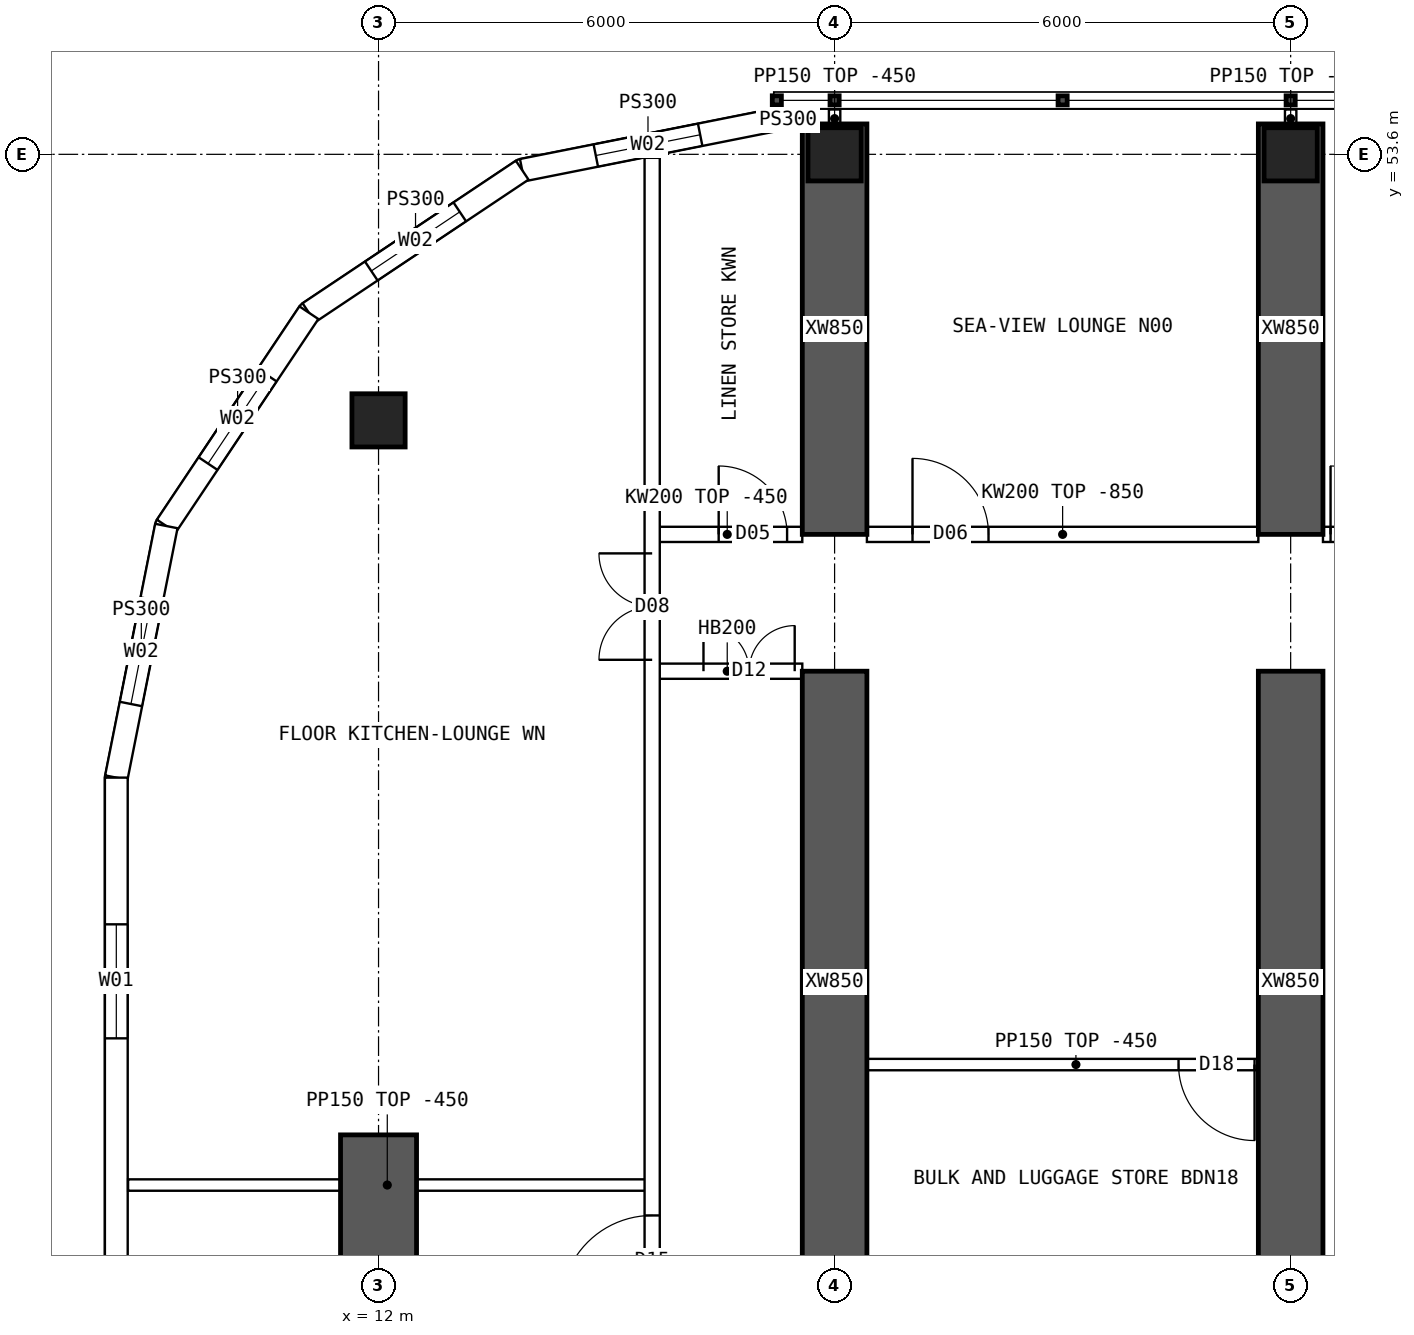
"""IFC4 building model, lengths in metres.
Left out: names, types, materials, properties, quantities, classifications, styles, units other than length and angle.
Written with IfcOpenShell. Run it as: python <this file> out.ifc"""

import sys

from ifc_helpers import new_model, si_unit, direction, frame, frame_2d, origin, origin_2d, place, context, subcontext, project, spatial, polyline, rectangle, hollow_rectangle, outline, extrude, element, fill, save


model = new_model("IFC4")
c1 = context("Model", 3, precision=1e-05, world=origin(), true_north=direction((0.0, 1.0)))
c2 = subcontext(c1, "Body", "Model", "MODEL_VIEW")
j1 = project(units=[si_unit("LENGTHUNIT", "METRE"), si_unit("PLANEANGLEUNIT", "RADIAN")], contexts=[c1])
p1 = place(None, origin())
s1 = spatial("IfcSite", under=j1, at=p1, CompositionType="ELEMENT")
p2 = place(p1, origin())
s2 = spatial("IfcBuilding", under=s1, at=p2, CompositionType="ELEMENT")
p3 = place(p2, frame((0.0, 0.0, 174.85)))
s3 = spatial("IfcBuildingStorey", under=s2, at=p3, CompositionType="ELEMENT", Elevation=174.85)
for number, where, z_axis, x_axis in (
    (1, (18.0, 53.6, 0.0), (0.0, 0.0, 1.0), (1.0, 0.0, 0.0)),
    (2, (24.0, 53.6, 0.0), (0.0, 0.0, 1.0), (1.0, 0.0, 0.0)),
    (3, (12.0, 50.1, 0.0), (0.0, 0.0, 1.0), (1.0, 0.0, 0.0)),
):
    element("IfcColumn", number, at=place(p3, frame(where, z_axis=z_axis, x_axis=x_axis)), inside=s3, PredefinedType="COLUMN", context=c2, shape_type="SweptSolid", body=[
        extrude(hollow_rectangle(XDim=0.7, YDim=0.7, WallThickness=0.07, at=origin_2d()), origin(), (0.0, 0.0, 1.0), 3.75),
    ])
p4 = place(p3, frame((12.0, 35.7, 0.0), z_axis=(0.0, 0.0, 1.0), x_axis=(0.0, 1.0, 0.0)))
e4 = element("IfcWall", 4, at=p4, inside=s3, PredefinedType="SHEAR", context=c2, shape_type="SweptSolid", body=[
    extrude(rectangle(XDim=5.0, YDim=1.0, at=frame_2d((2.5, 0.0))), origin(), (0.0, 0.0, 1.0), 3.75),
])
p5 = place(p3, frame((18.0, 48.6, 0.0), z_axis=(0.0, 0.0, 1.0), x_axis=(0.0, 1.0, 0.0)))
e5 = element("IfcWall", 5, at=p5, inside=s3, PredefinedType="SHEAR", context=c2, shape_type="SweptSolid", body=[
    extrude(rectangle(XDim=5.4, YDim=0.85, at=frame_2d((2.7, 0.0))), origin(), (0.0, 0.0, 1.0), 3.75),
])
p6 = place(p3, frame((18.0, 38.625, 0.0), z_axis=(0.0, 0.0, 1.0), x_axis=(0.0, 1.0, 0.0)))
e6 = element("IfcWall", 6, at=p6, inside=s3, PredefinedType="SHEAR", context=c2, shape_type="SweptSolid", body=[
    extrude(rectangle(XDim=8.175, YDim=0.85, at=frame_2d((4.087, 0.0))), origin(), (0.0, 0.0, 1.0), 3.75),
])
p7 = place(p3, frame((24.0, 48.6, 0.0), z_axis=(0.0, 0.0, 1.0), x_axis=(0.0, 1.0, 0.0)))
e7 = element("IfcWall", 7, at=p7, inside=s3, PredefinedType="SHEAR", context=c2, shape_type="SweptSolid", body=[
    extrude(rectangle(XDim=5.4, YDim=0.85, at=frame_2d((2.7, 0.0))), origin(), (0.0, 0.0, 1.0), 3.75),
])
p8 = place(p3, frame((24.0, 38.625, 0.0), z_axis=(0.0, 0.0, 1.0), x_axis=(0.0, 1.0, 0.0)))
e8 = element("IfcWall", 8, at=p8, inside=s3, PredefinedType="SHEAR", context=c2, shape_type="SweptSolid", body=[
    extrude(rectangle(XDim=8.175, YDim=0.85, at=frame_2d((4.087, 0.0))), origin(), (0.0, 0.0, 1.0), 3.75),
])
p9 = place(p3, frame((8.55, 45.4, 0.0), z_axis=(0.0, 0.0, 1.0), x_axis=(0.0, -1.0, 0.0)))
e9 = element("IfcWall", 9, at=p9, inside=s3, PredefinedType="SOLIDWALL", context=c2, shape_type="SweptSolid", body=[
    extrude(outline(polyline([(-0.015, -0.15), (26.815, -0.15), (26.785, 0.15), (0.015, 0.15), (-0.015, -0.15)])), origin(), (0.0, 0.0, 1.0), 3.3),
])
p10 = place(p9, frame((1.93, 0.0, 0.9)))
e10 = element("IfcOpeningElement", 10, at=p10, cuts=e9, PredefinedType="OPENING", context=c2, shape_type="SweptSolid", body=[
    extrude(rectangle(XDim=1.5, YDim=2.0, at=frame_2d((0.75, 1.0))), frame((0.0, 0.16, 0.0), z_axis=(0.0, -1.0, 0.0), x_axis=(1.0, 0.0, 0.0)), (0.0, 0.0, 1.0), 0.32),
])
p11 = place(p9, frame((7.29, 0.0, 0.9)))
e11 = element("IfcOpeningElement", 11, at=p11, cuts=e9, PredefinedType="OPENING", context=c2, shape_type="SweptSolid", body=[
    extrude(rectangle(XDim=1.5, YDim=2.0, at=frame_2d((0.75, 1.0))), frame((0.0, 0.16, 0.0), z_axis=(0.0, -1.0, 0.0), x_axis=(1.0, 0.0, 0.0)), (0.0, 0.0, 1.0), 0.32),
])
p12 = place(p9, frame((12.65, 0.0, 0.9)))
e12 = element("IfcOpeningElement", 12, at=p12, cuts=e9, PredefinedType="OPENING", context=c2, shape_type="SweptSolid", body=[
    extrude(rectangle(XDim=1.5, YDim=2.0, at=frame_2d((0.75, 1.0))), frame((0.0, 0.16, 0.0), z_axis=(0.0, -1.0, 0.0), x_axis=(1.0, 0.0, 0.0)), (0.0, 0.0, 1.0), 0.32),
])
p13 = place(p9, frame((18.01, 0.0, 0.9)))
e13 = element("IfcOpeningElement", 13, at=p13, cuts=e9, PredefinedType="OPENING", context=c2, shape_type="SweptSolid", body=[
    extrude(rectangle(XDim=1.5, YDim=2.0, at=frame_2d((0.75, 1.0))), frame((0.0, 0.16, 0.0), z_axis=(0.0, -1.0, 0.0), x_axis=(1.0, 0.0, 0.0)), (0.0, 0.0, 1.0), 0.32),
])
p14 = place(p9, frame((23.37, 0.0, 0.9)))
e14 = element("IfcOpeningElement", 14, at=p14, cuts=e9, PredefinedType="OPENING", context=c2, shape_type="SweptSolid", body=[
    extrude(rectangle(XDim=1.5, YDim=2.0, at=frame_2d((0.75, 1.0))), frame((0.0, 0.16, 0.0), z_axis=(0.0, -1.0, 0.0), x_axis=(1.0, 0.0, 0.0)), (0.0, 0.0, 1.0), 0.32),
])
p15 = place(p3, frame((17.2, 54.05, 0.0), z_axis=(0.0, 0.0, 1.0), x_axis=(-0.98078325777, -0.195100490205, 0.0)))
e15 = element("IfcWall", 15, at=p15, inside=s3, PredefinedType="SOLIDWALL", context=c2, shape_type="SweptSolid", body=[
    extrude(outline(polyline([(-0.03, -0.15), (3.405, -0.15), (3.345, 0.15), (0.03, 0.15), (-0.03, -0.15)])), origin(), (0.0, 0.0, 1.0), 3.3),
])
p16 = place(p15, frame((0.988, 0.0, 0.9)))
e16 = element("IfcOpeningElement", 16, at=p16, cuts=e15, PredefinedType="OPENING", context=c2, shape_type="SweptSolid", body=[
    extrude(rectangle(XDim=1.4, YDim=1.8, at=frame_2d((0.7, 0.9))), frame((0.0, 0.16, 0.0), z_axis=(0.0, -1.0, 0.0), x_axis=(1.0, 0.0, 0.0)), (0.0, 0.0, 1.0), 0.32),
])
p17 = place(p3, frame((13.89, 53.392, 0.0), z_axis=(0.0, 0.0, 1.0), x_axis=(-0.831493450887, -0.555534554399, 0.0)))
e17 = element("IfcWall", 17, at=p17, inside=s3, PredefinedType="SOLIDWALL", context=c2, shape_type="SweptSolid", body=[
    extrude(outline(polyline([(-0.03, -0.15), (3.405, -0.15), (3.345, 0.15), (0.03, 0.15), (-0.03, -0.15)])), origin(), (0.0, 0.0, 1.0), 3.3),
])
p18 = place(p17, frame((0.988, 0.0, 0.9)))
e18 = element("IfcOpeningElement", 18, at=p18, cuts=e17, PredefinedType="OPENING", context=c2, shape_type="SweptSolid", body=[
    extrude(rectangle(XDim=1.4, YDim=1.8, at=frame_2d((0.7, 0.9))), frame((0.0, 0.16, 0.0), z_axis=(0.0, -1.0, 0.0), x_axis=(1.0, 0.0, 0.0)), (0.0, 0.0, 1.0), 0.32),
])
p19 = place(p3, frame((11.083, 51.517, 0.0), z_axis=(0.0, 0.0, 1.0), x_axis=(-0.555534554399, -0.831493450887, 0.0)))
e19 = element("IfcWall", 19, at=p19, inside=s3, PredefinedType="SOLIDWALL", context=c2, shape_type="SweptSolid", body=[
    extrude(outline(polyline([(-0.03, -0.15), (3.405, -0.15), (3.345, 0.15), (0.03, 0.15), (-0.03, -0.15)])), origin(), (0.0, 0.0, 1.0), 3.3),
])
p20 = place(p19, frame((0.988, 0.0, 0.9)))
e20 = element("IfcOpeningElement", 20, at=p20, cuts=e19, PredefinedType="OPENING", context=c2, shape_type="SweptSolid", body=[
    extrude(rectangle(XDim=1.4, YDim=1.8, at=frame_2d((0.7, 0.9))), frame((0.0, 0.16, 0.0), z_axis=(0.0, -1.0, 0.0), x_axis=(1.0, 0.0, 0.0)), (0.0, 0.0, 1.0), 0.32),
])
p21 = place(p3, frame((9.208, 48.71, 0.0), z_axis=(0.0, 0.0, 1.0), x_axis=(-0.19508664885, -0.980786011034, 0.0)))
e21 = element("IfcWall", 21, at=p21, inside=s3, PredefinedType="SOLIDWALL", context=c2, shape_type="SweptSolid", body=[
    extrude(outline(polyline([(-0.03, -0.15), (3.39, -0.15), (3.36, 0.15), (0.03, 0.15), (-0.03, -0.15)])), origin(), (0.0, 0.0, 1.0), 3.3),
])
p22 = place(p21, frame((0.988, 0.0, 0.9)))
e22 = element("IfcOpeningElement", 22, at=p22, cuts=e21, PredefinedType="OPENING", context=c2, shape_type="SweptSolid", body=[
    extrude(rectangle(XDim=1.4, YDim=1.8, at=frame_2d((0.7, 0.9))), frame((0.0, 0.16, 0.0), z_axis=(0.0, -1.0, 0.0), x_axis=(1.0, 0.0, 0.0)), (0.0, 0.0, 1.0), 0.32),
])
p23 = place(p3, frame((17.2, 54.05, 0.0), z_axis=(0.0, 0.0, 1.0), x_axis=(1.0, 0.0, 0.0)))
e23 = element("IfcWall", 23, at=p23, inside=s3, PredefinedType="SOLIDWALL", context=c2, shape_type="SweptSolid", body=[
    extrude(rectangle(XDim=0.375, YDim=0.3, at=frame_2d((0.188, 0.0))), origin(), (0.0, 0.0, 1.0), 3.3),
])
p24 = place(p3, frame((15.6, 48.6, 0.0), z_axis=(0.0, 0.0, 1.0), x_axis=(1.0, 0.0, 0.0)))
e24 = element("IfcWall", 24, at=p24, inside=s3, PredefinedType="SOLIDWALL", context=c2, shape_type="SweptSolid", body=[
    extrude(rectangle(XDim=1.975, YDim=0.2, at=frame_2d((0.987, 0.0))), origin(), (0.0, 0.0, 1.0), 3.3),
])
p25 = place(p24, frame((0.875, 0.0, 0.0)))
e25 = element("IfcOpeningElement", 25, at=p25, cuts=e24, PredefinedType="OPENING", context=c2, shape_type="SweptSolid", body=[
    extrude(rectangle(XDim=0.9, YDim=2.1, at=frame_2d((0.45, 1.05))), frame((0.0, 0.11, 0.0), z_axis=(0.0, -1.0, 0.0), x_axis=(1.0, 0.0, 0.0)), (0.0, 0.0, 1.0), 0.22),
])
p26 = place(p3, frame((15.6, 46.8, 0.0), z_axis=(0.0, 0.0, 1.0), x_axis=(1.0, 0.0, 0.0)))
e26 = element("IfcWall", 26, at=p26, inside=s3, PredefinedType="SOLIDWALL", context=c2, shape_type="SweptSolid", body=[
    extrude(rectangle(XDim=1.975, YDim=0.2, at=frame_2d((0.987, 0.0))), origin(), (0.0, 0.0, 1.0), 3.3),
])
p27 = place(p26, frame((0.675, 0.0, 0.0)))
e27 = element("IfcOpeningElement", 27, at=p27, cuts=e26, PredefinedType="OPENING", context=c2, shape_type="SweptSolid", body=[
    extrude(rectangle(XDim=1.2, YDim=2.1, at=frame_2d((0.6, 1.05))), frame((0.0, 0.11, 0.0), z_axis=(0.0, -1.0, 0.0), x_axis=(1.0, 0.0, 0.0)), (0.0, 0.0, 1.0), 0.22),
])
p28 = place(p3, frame((18.425, 48.6, 0.0), z_axis=(0.0, 0.0, 1.0), x_axis=(1.0, 0.0, 0.0)))
e28 = element("IfcWall", 28, at=p28, inside=s3, PredefinedType="SOLIDWALL", context=c2, shape_type="SweptSolid", body=[
    extrude(outline(polyline([(0.0, 0.0), (5.15, 0.0), (5.15, 2.9), (0.0, 2.9), (0.0, 0.0)])), frame((0.0, 0.1, 0.0), z_axis=(0.0, -1.0, 0.0), x_axis=(1.0, 0.0, 0.0)), (0.0, 0.0, 1.0), 0.2),
])
p29 = place(p28, frame((0.6, 0.0, 0.0)))
e29 = element("IfcOpeningElement", 29, at=p29, cuts=e28, PredefinedType="OPENING", context=c2, shape_type="SweptSolid", body=[
    extrude(rectangle(XDim=1.0, YDim=2.1, at=frame_2d((0.5, 1.05))), frame((0.0, 0.11, 0.0), z_axis=(0.0, -1.0, 0.0), x_axis=(1.0, 0.0, 0.0)), (0.0, 0.0, 1.0), 0.22),
])
p30 = place(p3, frame((24.425, 48.6, 0.0), z_axis=(0.0, 0.0, 1.0), x_axis=(1.0, 0.0, 0.0)))
e30 = element("IfcWall", 30, at=p30, inside=s3, PredefinedType="SOLIDWALL", context=c2, shape_type="SweptSolid", body=[
    extrude(outline(polyline([(0.0, 0.0), (5.15, 0.0), (5.15, 2.9), (0.0, 2.9), (0.0, 0.0)])), frame((0.0, 0.1, 0.0), z_axis=(0.0, -1.0, 0.0), x_axis=(1.0, 0.0, 0.0)), (0.0, 0.0, 1.0), 0.2),
])
p31 = place(p30, frame((0.1, 0.0, 0.0)))
e31 = element("IfcOpeningElement", 31, at=p31, cuts=e30, PredefinedType="OPENING", context=c2, shape_type="SweptSolid", body=[
    extrude(rectangle(XDim=0.9, YDim=2.1, at=frame_2d((0.45, 1.05))), frame((0.0, 0.11, 0.0), z_axis=(0.0, -1.0, 0.0), x_axis=(1.0, 0.0, 0.0)), (0.0, 0.0, 1.0), 0.22),
])
p32 = place(p3, frame((23.925, 41.625, 0.0), z_axis=(0.0, 0.0, 1.0), x_axis=(-1.0, 0.0, 0.0)))
e32 = element("IfcWall", 32, at=p32, inside=s3, PredefinedType="PARTITIONING", context=c2, shape_type="SweptSolid", body=[
    extrude(rectangle(XDim=5.5, YDim=0.15, at=frame_2d((2.75, 0.0))), origin(), (0.0, 0.0, 1.0), 3.3),
])
p33 = place(p32, frame((0.4, 0.0, 0.0)))
e33 = element("IfcOpeningElement", 33, at=p33, cuts=e32, PredefinedType="OPENING", context=c2, shape_type="SweptSolid", body=[
    extrude(rectangle(XDim=1.0, YDim=2.1, at=frame_2d((0.5, 1.05))), frame((0.0, 0.085, 0.0), z_axis=(0.0, -1.0, 0.0), x_axis=(1.0, 0.0, 0.0)), (0.0, 0.0, 1.0), 0.17),
])
p34 = place(p3, frame((15.6, 10.446, 0.0), z_axis=(0.0, 0.0, 1.0), x_axis=(0.0, 1.0, 0.0)))
e34 = element("IfcWall", 34, at=p34, inside=s3, PredefinedType="SOLIDWALL", context=c2, shape_type="SweptSolid", body=[
    extrude(rectangle(XDim=43.107, YDim=0.2, at=frame_2d((21.554, 0.0))), origin(), (0.0, 0.0, 1.0), 3.3),
])
p35 = place(p34, frame((13.914, 0.0, 0.0)))
e35 = element("IfcOpeningElement", 35, at=p35, cuts=e34, PredefinedType="OPENING", context=c2, shape_type="SweptSolid", body=[
    extrude(rectangle(XDim=1.2, YDim=2.1, at=frame_2d((0.6, 1.05))), frame((0.0, 0.11, 0.0), z_axis=(0.0, -1.0, 0.0), x_axis=(1.0, 0.0, 0.0)), (0.0, 0.0, 1.0), 0.22),
])
p36 = place(p34, frame((27.994, 0.0, 0.0)))
e36 = element("IfcOpeningElement", 36, at=p36, cuts=e34, PredefinedType="OPENING", context=c2, shape_type="SweptSolid", body=[
    extrude(rectangle(XDim=1.2, YDim=2.1, at=frame_2d((0.6, 1.05))), frame((0.0, 0.11, 0.0), z_axis=(0.0, -1.0, 0.0), x_axis=(1.0, 0.0, 0.0)), (0.0, 0.0, 1.0), 0.22),
])
p37 = place(p34, frame((5.104, 0.0, 0.0)))
e37 = element("IfcOpeningElement", 37, at=p37, cuts=e34, PredefinedType="OPENING", context=c2, shape_type="SweptSolid", body=[
    extrude(rectangle(XDim=1.4, YDim=2.1, at=frame_2d((0.7, 1.05))), frame((0.0, 0.11, 0.0), z_axis=(0.0, -1.0, 0.0), x_axis=(1.0, 0.0, 0.0)), (0.0, 0.0, 1.0), 0.22),
])
p38 = place(p34, frame((36.504, 0.0, 0.0)))
e38 = element("IfcOpeningElement", 38, at=p38, cuts=e34, PredefinedType="OPENING", context=c2, shape_type="SweptSolid", body=[
    extrude(rectangle(XDim=1.4, YDim=2.1, at=frame_2d((0.7, 1.05))), frame((0.0, 0.11, 0.0), z_axis=(0.0, -1.0, 0.0), x_axis=(1.0, 0.0, 0.0)), (0.0, 0.0, 1.0), 0.22),
])
p39 = place(p3, frame((8.705, 40.04, 0.0), z_axis=(0.0, 0.0, 1.0), x_axis=(1.0, 0.0, 0.0)))
e39 = element("IfcWall", 39, at=p39, inside=s3, PredefinedType="PARTITIONING", context=c2, shape_type="SweptSolid", body=[
    extrude(rectangle(XDim=6.82, YDim=0.15, at=frame_2d((3.41, 0.0))), origin(), (0.0, 0.0, 1.0), 3.3),
])
for number, where, z_axis, x_axis in (
    (40, (18.0, 53.95, 0.0), (0.0, 0.0, 1.0), (0.0, 1.0, 0.0)),
    (41, (24.0, 53.95, 0.0), (0.0, 0.0, 1.0), (0.0, 1.0, 0.0)),
):
    element("IfcWall", number, at=place(p3, frame(where, z_axis=z_axis, x_axis=x_axis)), inside=s3, PredefinedType="PARTITIONING", context=c2, shape_type="SweptSolid", body=[
        extrude(rectangle(XDim=0.24, YDim=0.15, at=frame_2d((0.12, 0.0))), origin(), (0.0, 0.0, 1.0), 3.3),
    ])
p40 = place(p10, origin())
e42 = element("IfcWindow", 42, at=p40, inside=s3, PartitioningType="SINGLE_PANEL", PredefinedType="WINDOW", context=c2, shape_type="SweptSolid", body=[
    extrude(rectangle(XDim=1.5, YDim=2.0, at=frame_2d((0.75, 1.0))), frame((0.0, 0.03, 0.0), z_axis=(0.0, -1.0, 0.0), x_axis=(1.0, 0.0, 0.0)), (0.0, 0.0, 1.0), 0.06),
])
fill(e10, e42)
p41 = place(p16, origin())
e43 = element("IfcWindow", 43, at=p41, inside=s3, PartitioningType="SINGLE_PANEL", PredefinedType="WINDOW", context=c2, shape_type="SweptSolid", body=[
    extrude(rectangle(XDim=1.4, YDim=1.8, at=frame_2d((0.7, 0.9))), frame((0.0, 0.03, 0.0), z_axis=(0.0, -1.0, 0.0), x_axis=(1.0, 0.0, 0.0)), (0.0, 0.0, 1.0), 0.06),
])
fill(e16, e43)
p42 = place(p18, origin())
e44 = element("IfcWindow", 44, at=p42, inside=s3, PartitioningType="SINGLE_PANEL", PredefinedType="WINDOW", context=c2, shape_type="SweptSolid", body=[
    extrude(rectangle(XDim=1.4, YDim=1.8, at=frame_2d((0.7, 0.9))), frame((0.0, 0.03, 0.0), z_axis=(0.0, -1.0, 0.0), x_axis=(1.0, 0.0, 0.0)), (0.0, 0.0, 1.0), 0.06),
])
fill(e18, e44)
p43 = place(p20, origin())
e45 = element("IfcWindow", 45, at=p43, inside=s3, PartitioningType="SINGLE_PANEL", PredefinedType="WINDOW", context=c2, shape_type="SweptSolid", body=[
    extrude(rectangle(XDim=1.4, YDim=1.8, at=frame_2d((0.7, 0.9))), frame((0.0, 0.03, 0.0), z_axis=(0.0, -1.0, 0.0), x_axis=(1.0, 0.0, 0.0)), (0.0, 0.0, 1.0), 0.06),
])
fill(e20, e45)
p44 = place(p22, origin())
e46 = element("IfcWindow", 46, at=p44, inside=s3, PartitioningType="SINGLE_PANEL", PredefinedType="WINDOW", context=c2, shape_type="SweptSolid", body=[
    extrude(rectangle(XDim=1.4, YDim=1.8, at=frame_2d((0.7, 0.9))), frame((0.0, 0.03, 0.0), z_axis=(0.0, -1.0, 0.0), x_axis=(1.0, 0.0, 0.0)), (0.0, 0.0, 1.0), 0.06),
])
fill(e22, e46)
p45 = place(p27, origin())
e47 = element("IfcDoor", 47, at=p45, inside=s3, OperationType="DOUBLE_DOOR_SINGLE_SWING", PredefinedType="DOOR", context=c2, shape_type="SweptSolid", body=[
    extrude(rectangle(XDim=1.2, YDim=2.1, at=frame_2d((0.6, 1.05))), frame((0.0, 0.025, 0.0), z_axis=(0.0, -1.0, 0.0), x_axis=(1.0, 0.0, 0.0)), (0.0, 0.0, 1.0), 0.05),
])
fill(e27, e47)
p46 = place(p29, origin())
e48 = element("IfcDoor", 48, at=p46, inside=s3, OperationType="SINGLE_SWING_LEFT", PredefinedType="DOOR", context=c2, shape_type="SweptSolid", body=[
    extrude(rectangle(XDim=1.0, YDim=2.1, at=frame_2d((0.5, 1.05))), frame((0.0, 0.025, 0.0), z_axis=(0.0, -1.0, 0.0), x_axis=(1.0, 0.0, 0.0)), (0.0, 0.0, 1.0), 0.05),
])
fill(e29, e48)
p47 = place(p31, origin())
e49 = element("IfcDoor", 49, at=p47, inside=s3, OperationType="SINGLE_SWING_LEFT", PredefinedType="DOOR", context=c2, shape_type="SweptSolid", body=[
    extrude(rectangle(XDim=0.9, YDim=2.1, at=frame_2d((0.45, 1.05))), frame((0.0, 0.025, 0.0), z_axis=(0.0, -1.0, 0.0), x_axis=(1.0, 0.0, 0.0)), (0.0, 0.0, 1.0), 0.05),
])
fill(e31, e49)
p48 = place(p33, origin())
e50 = element("IfcDoor", 50, at=p48, inside=s3, OperationType="SINGLE_SWING_LEFT", PredefinedType="DOOR", context=c2, shape_type="SweptSolid", body=[
    extrude(rectangle(XDim=1.0, YDim=2.1, at=frame_2d((0.5, 1.05))), frame((0.0, 0.025, 0.0), z_axis=(0.0, -1.0, 0.0), x_axis=(1.0, 0.0, 0.0)), (0.0, 0.0, 1.0), 0.05),
])
fill(e33, e50)
p49 = place(p36, origin())
e51 = element("IfcDoor", 51, at=p49, inside=s3, OperationType="SINGLE_SWING_LEFT", PredefinedType="DOOR", context=c2, shape_type="SweptSolid", body=[
    extrude(rectangle(XDim=1.2, YDim=2.1, at=frame_2d((0.6, 1.05))), frame((0.0, 0.025, 0.0), z_axis=(0.0, -1.0, 0.0), x_axis=(1.0, 0.0, 0.0)), (0.0, 0.0, 1.0), 0.05),
])
fill(e36, e51)
p50 = place(p38, origin())
e52 = element("IfcDoor", 52, at=p50, inside=s3, OperationType="DOUBLE_DOOR_SINGLE_SWING", PredefinedType="DOOR", context=c2, shape_type="SweptSolid", body=[
    extrude(rectangle(XDim=1.4, YDim=2.1, at=frame_2d((0.7, 1.05))), frame((0.0, 0.025, 0.0), z_axis=(0.0, -1.0, 0.0), x_axis=(1.0, 0.0, 0.0)), (0.0, 0.0, 1.0), 0.05),
])
fill(e38, e52)
p51 = place(p25, origin())
e53 = element("IfcDoor", 53, at=p51, inside=s3, OperationType="SINGLE_SWING_LEFT", PredefinedType="DOOR", context=c2, shape_type="SweptSolid", body=[
    extrude(rectangle(XDim=0.9, YDim=2.1, at=frame_2d((0.45, 1.05))), frame((0.0, 0.025, 0.0), z_axis=(0.0, -1.0, 0.0), x_axis=(1.0, 0.0, 0.0)), (0.0, 0.0, 1.0), 0.05),
])
fill(e25, e53)
save(model, sys.argv[1])
